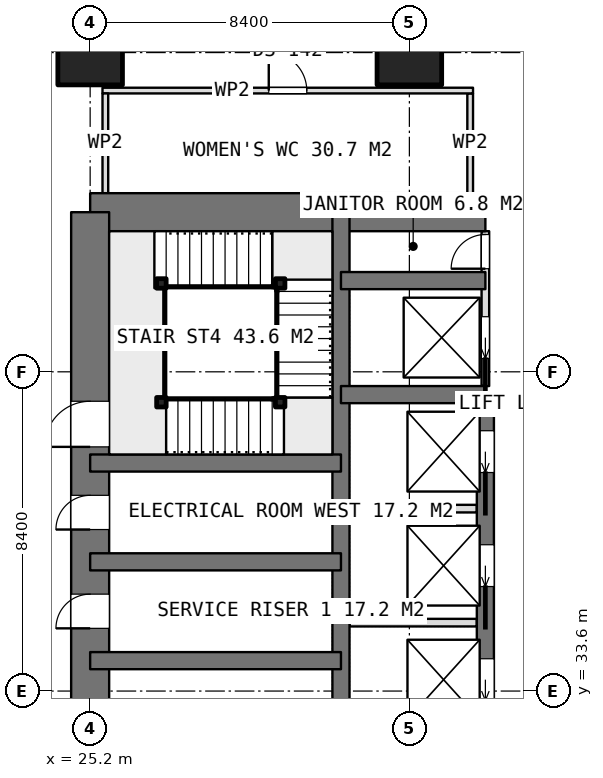
"""IFC4 building model, lengths in metres.
Left out: names, types, materials, properties, quantities, classifications, styles, units other than length and angle.
Written with IfcOpenShell. Run it as: python <this file> out.ifc"""

import sys

from ifc_helpers import new_model, si_unit, direction, frame, frame_2d, origin, origin_2d, place, context, subcontext, project, spatial, rectangle, extrude, element, fill, save


model = new_model("IFC4")
c1 = context("Model", 3, precision=1e-05, world=origin(), true_north=direction((0.0, 1.0)))
c2 = subcontext(c1, "Body", "Model", "MODEL_VIEW")
j1 = project(units=[si_unit("LENGTHUNIT", "METRE"), si_unit("PLANEANGLEUNIT", "RADIAN")], contexts=[c1])
p1 = place(None, origin())
s1 = spatial("IfcSite", under=j1, at=p1, CompositionType="ELEMENT")
p2 = place(p1, origin())
s2 = spatial("IfcBuilding", under=s1, at=p2, CompositionType="ELEMENT")
p3 = place(p2, frame((0.0, 0.0, 132.8)))
s3 = spatial("IfcBuildingStorey", under=s2, at=p3, CompositionType="ELEMENT", Elevation=132.8)
p4 = place(p3, frame((25.2, 46.2, 0.0), z_axis=(0.0, 0.0, 1.0), x_axis=(1.0, 0.0, 0.0)))
e1 = element("IfcWall", 1, at=p4, inside=s3, PredefinedType="SHEAR", context=c2, shape_type="SweptSolid", body=[
    extrude(rectangle(XDim=10.4, YDim=1.0, at=frame_2d((5.2, 0.0))), origin(), (0.0, 0.0, 1.0), 3.75),
])
p5 = place(p3, frame((25.2, 21.0, 0.0), z_axis=(0.0, 0.0, 1.0), x_axis=(0.0, 1.0, 0.0)))
e2 = element("IfcWall", 2, at=p5, inside=s3, PredefinedType="SHEAR", context=c2, shape_type="SweptSolid", body=[
    extrude(rectangle(XDim=25.2, YDim=1.0, at=frame_2d((12.6, 0.0))), origin(), (0.0, 0.0, 1.0), 3.75),
])
p6 = place(p5, frame((7.8, 0.0, 0.0)))
e3 = element("IfcOpeningElement", 3, at=p6, cuts=e2, PredefinedType="OPENING", context=c2, shape_type="SweptSolid", body=[
    extrude(rectangle(XDim=1.2, YDim=2.1, at=frame_2d((0.6, 1.05))), frame((0.0, 0.51, 0.0), z_axis=(0.0, -1.0, 0.0), x_axis=(1.0, 0.0, 0.0)), (0.0, 0.0, 1.0), 1.02),
])
p7 = place(p5, frame((14.25, 0.0, 0.0)))
e4 = element("IfcOpeningElement", 4, at=p7, cuts=e2, PredefinedType="OPENING", context=c2, shape_type="SweptSolid", body=[
    extrude(rectangle(XDim=0.9, YDim=2.1, at=frame_2d((0.45, 1.05))), frame((0.0, 0.51, 0.0), z_axis=(0.0, -1.0, 0.0), x_axis=(1.0, 0.0, 0.0)), (0.0, 0.0, 1.0), 1.02),
])
p8 = place(p5, frame((16.85, 0.0, 0.0)))
e5 = element("IfcOpeningElement", 5, at=p8, cuts=e2, PredefinedType="OPENING", context=c2, shape_type="SweptSolid", body=[
    extrude(rectangle(XDim=0.9, YDim=2.1, at=frame_2d((0.45, 1.05))), frame((0.0, 0.51, 0.0), z_axis=(0.0, -1.0, 0.0), x_axis=(1.0, 0.0, 0.0)), (0.0, 0.0, 1.0), 1.02),
])
p9 = place(p5, frame((19.025, 0.0, 0.0)))
e6 = element("IfcOpeningElement", 6, at=p9, cuts=e2, PredefinedType="OPENING", context=c2, shape_type="SweptSolid", body=[
    extrude(rectangle(XDim=1.2, YDim=2.1, at=frame_2d((0.6, 1.05))), frame((0.0, 0.51, 0.0), z_axis=(0.0, -1.0, 0.0), x_axis=(1.0, 0.0, 0.0)), (0.0, 0.0, 1.0), 1.02),
])
p10 = place(p3, frame((31.8, 21.0, 0.0), z_axis=(0.0, 0.0, 1.0), x_axis=(0.0, 1.0, 0.0)))
e7 = element("IfcWall", 7, at=p10, inside=s3, PredefinedType="SHEAR", context=c2, shape_type="SweptSolid", body=[
    extrude(rectangle(XDim=25.2, YDim=0.45, at=frame_2d((12.6, 0.0))), origin(), (0.0, 0.0, 1.0), 3.75),
])
p11 = place(p3, frame((35.6, 23.4, 0.0), z_axis=(0.0, 0.0, 1.0), x_axis=(0.0, 1.0, 0.0)))
e8 = element("IfcWall", 8, at=p11, inside=s3, PredefinedType="SHEAR", context=c2, shape_type="SweptSolid", body=[
    extrude(rectangle(XDim=18.0, YDim=0.45, at=frame_2d((9.0, 0.0))), origin(), (0.0, 0.0, 1.0), 3.75),
])
p12 = place(p11, frame((0.95, 0.0, 0.0)))
e9 = element("IfcOpeningElement", 9, at=p12, cuts=e8, PredefinedType="OPENING", context=c2, shape_type="SweptSolid", body=[
    extrude(rectangle(XDim=1.1, YDim=2.1, at=frame_2d((0.55, 1.05))), frame((0.0, 0.235, 0.0), z_axis=(0.0, -1.0, 0.0), x_axis=(1.0, 0.0, 0.0)), (0.0, 0.0, 1.0), 0.47),
])
p13 = place(p11, frame((3.95, 0.0, 0.0)))
e10 = element("IfcOpeningElement", 10, at=p13, cuts=e8, PredefinedType="OPENING", context=c2, shape_type="SweptSolid", body=[
    extrude(rectangle(XDim=1.1, YDim=2.1, at=frame_2d((0.55, 1.05))), frame((0.0, 0.235, 0.0), z_axis=(0.0, -1.0, 0.0), x_axis=(1.0, 0.0, 0.0)), (0.0, 0.0, 1.0), 0.47),
])
p14 = place(p11, frame((6.95, 0.0, 0.0)))
e11 = element("IfcOpeningElement", 11, at=p14, cuts=e8, PredefinedType="OPENING", context=c2, shape_type="SweptSolid", body=[
    extrude(rectangle(XDim=1.1, YDim=2.1, at=frame_2d((0.55, 1.05))), frame((0.0, 0.235, 0.0), z_axis=(0.0, -1.0, 0.0), x_axis=(1.0, 0.0, 0.0)), (0.0, 0.0, 1.0), 0.47),
])
p15 = place(p11, frame((9.95, 0.0, 0.0)))
e12 = element("IfcOpeningElement", 12, at=p15, cuts=e8, PredefinedType="OPENING", context=c2, shape_type="SweptSolid", body=[
    extrude(rectangle(XDim=1.1, YDim=2.1, at=frame_2d((0.55, 1.05))), frame((0.0, 0.235, 0.0), z_axis=(0.0, -1.0, 0.0), x_axis=(1.0, 0.0, 0.0)), (0.0, 0.0, 1.0), 0.47),
])
p16 = place(p11, frame((12.95, 0.0, 0.0)))
e13 = element("IfcOpeningElement", 13, at=p16, cuts=e8, PredefinedType="OPENING", context=c2, shape_type="SweptSolid", body=[
    extrude(rectangle(XDim=1.1, YDim=2.1, at=frame_2d((0.55, 1.05))), frame((0.0, 0.235, 0.0), z_axis=(0.0, -1.0, 0.0), x_axis=(1.0, 0.0, 0.0)), (0.0, 0.0, 1.0), 0.47),
])
p17 = place(p11, frame((15.95, 0.0, 0.0)))
e14 = element("IfcOpeningElement", 14, at=p17, cuts=e8, PredefinedType="OPENING", context=c2, shape_type="SweptSolid", body=[
    extrude(rectangle(XDim=1.1, YDim=2.1, at=frame_2d((0.55, 1.05))), frame((0.0, 0.235, 0.0), z_axis=(0.0, -1.0, 0.0), x_axis=(1.0, 0.0, 0.0)), (0.0, 0.0, 1.0), 0.47),
])
for number, where, z_axis, x_axis in (
    (15, (31.8, 41.4, 0.0), (0.0, 0.0, 1.0), (1.0, 0.0, 0.0)),
    (16, (31.8, 44.4, 0.0), (0.0, 0.0, 1.0), (1.0, 0.0, 0.0)),
):
    element("IfcWall", number, at=place(p3, frame(where, z_axis=z_axis, x_axis=x_axis)), inside=s3, PredefinedType="SHEAR", context=c2, shape_type="SweptSolid", body=[
        extrude(rectangle(XDim=3.8, YDim=0.45, at=frame_2d((1.9, 0.0))), origin(), (0.0, 0.0, 1.0), 3.75),
    ])
for number, where, z_axis, x_axis in (
    (17, (25.2, 34.4, 0.0), (0.0, 0.0, 1.0), (1.0, 0.0, 0.0)),
    (18, (25.2, 37.0, 0.0), (0.0, 0.0, 1.0), (1.0, 0.0, 0.0)),
    (19, (25.2, 39.6, 0.0), (0.0, 0.0, 1.0), (1.0, 0.0, 0.0)),
):
    element("IfcWall", number, at=place(p3, frame(where, z_axis=z_axis, x_axis=x_axis)), inside=s3, PredefinedType="SHEAR", context=c2, shape_type="SweptSolid", body=[
        extrude(rectangle(XDim=6.6, YDim=0.45, at=frame_2d((3.3, 0.0))), origin(), (0.0, 0.0, 1.0), 3.75),
    ])
for number, where, z_axis, x_axis in (
    (20, (25.2, 50.4, 0.0), (0.0, 0.0, 1.0), (1.0, 0.0, 0.0)),
    (21, (33.6, 50.4, 0.0), (0.0, 0.0, 1.0), (1.0, 0.0, 0.0)),
):
    element("IfcColumn", number, at=place(p3, frame(where, z_axis=z_axis, x_axis=x_axis)), inside=s3, PredefinedType="COLUMN", context=c2, shape_type="SweptSolid", body=[
        extrude(rectangle(XDim=1.7, YDim=1.7, at=origin_2d()), origin(), (0.0, 0.0, 1.0), 3.75),
    ])
for number, where, z_axis, x_axis in (
    (22, (32.025, 35.4, 0.0), (0.0, 0.0, 1.0), (1.0, 0.0, 0.0)),
    (23, (32.025, 38.4, 0.0), (0.0, 0.0, 1.0), (1.0, 0.0, 0.0)),
):
    element("IfcWall", number, at=place(p3, frame(where, z_axis=z_axis, x_axis=x_axis)), inside=s3, PredefinedType="PARTITIONING", context=c2, shape_type="SweptSolid", body=[
        extrude(rectangle(XDim=3.35, YDim=0.2, at=frame_2d((1.675, 0.0))), origin(), (0.0, 0.0, 1.0), 3.5),
    ])
p18 = place(p3, frame((35.6, 41.625, 0.0), z_axis=(0.0, 0.0, 1.0), x_axis=(0.0, 1.0, 0.0)))
e24 = element("IfcWall", 24, at=p18, inside=s3, PredefinedType="PARTITIONING", context=c2, shape_type="SweptSolid", body=[
    extrude(rectangle(XDim=4.075, YDim=0.2, at=frame_2d((2.038, 0.0))), origin(), (0.0, 0.0, 1.0), 3.5),
])
p19 = place(p18, frame((3.088, 0.0, 0.0)))
e25 = element("IfcOpeningElement", 25, at=p19, cuts=e24, PredefinedType="OPENING", context=c2, shape_type="SweptSolid", body=[
    extrude(rectangle(XDim=0.9, YDim=2.1, at=frame_2d((0.45, 1.05))), frame((0.0, 0.11, 0.0), z_axis=(0.0, -1.0, 0.0), x_axis=(1.0, 0.0, 0.0)), (0.0, 0.0, 1.0), 0.22),
])
p20 = place(p18, frame((0.725, 0.0, 0.0)))
e26 = element("IfcOpeningElement", 26, at=p20, cuts=e24, PredefinedType="OPENING", context=c2, shape_type="SweptSolid", body=[
    extrude(rectangle(XDim=1.1, YDim=2.1, at=frame_2d((0.55, 1.05))), frame((0.0, 0.11, 0.0), z_axis=(0.0, -1.0, 0.0), x_axis=(1.0, 0.0, 0.0)), (0.0, 0.0, 1.0), 0.22),
])
p21 = place(p3, frame((25.525, 49.4, 0.0), z_axis=(0.0, 0.0, 1.0), x_axis=(1.0, 0.0, 0.0)))
e27 = element("IfcWall", 27, at=p21, inside=s3, PredefinedType="PARTITIONING", context=c2, shape_type="SweptSolid", body=[
    extrude(rectangle(XDim=9.75, YDim=0.15, at=frame_2d((4.875, 0.0))), origin(), (0.0, 0.0, 1.0), 3.5),
])
p22 = place(p21, frame((4.375, 0.0, 0.0)))
e28 = element("IfcOpeningElement", 28, at=p22, cuts=e27, PredefinedType="OPENING", context=c2, shape_type="SweptSolid", body=[
    extrude(rectangle(XDim=1.0, YDim=2.1, at=frame_2d((0.5, 1.05))), frame((0.0, 0.085, 0.0), z_axis=(0.0, -1.0, 0.0), x_axis=(1.0, 0.0, 0.0)), (0.0, 0.0, 1.0), 0.17),
])
for number, where, z_axis, x_axis in (
    (29, (25.6, 46.7, 0.0), (0.0, 0.0, 1.0), (0.0, 1.0, 0.0)),
    (30, (35.2, 46.7, 0.0), (0.0, 0.0, 1.0), (0.0, 1.0, 0.0)),
):
    element("IfcWall", number, at=place(p3, frame(where, z_axis=z_axis, x_axis=x_axis)), inside=s3, PredefinedType="PARTITIONING", context=c2, shape_type="SweptSolid", body=[
        extrude(rectangle(XDim=2.625, YDim=0.15, at=frame_2d((1.312, 0.0))), origin(), (0.0, 0.0, 1.0), 3.5),
    ])
for number, where, z_axis, x_axis in (
    (31, (27.075, 41.2, 0.0), (0.0, 0.0, 1.0), (1.0, 0.0, 0.0)),
    (32, (30.2, 41.2, 0.0), (0.0, 0.0, 1.0), (1.0, 0.0, 0.0)),
    (33, (30.2, 44.325, 0.0), (0.0, 0.0, 1.0), (1.0, 0.0, 0.0)),
    (34, (27.075, 44.325, 0.0), (0.0, 0.0, 1.0), (1.0, 0.0, 0.0)),
):
    element("IfcColumn", number, at=place(p3, frame(where, z_axis=z_axis, x_axis=x_axis)), inside=s3, PredefinedType="COLUMN", context=c2, shape_type="SweptSolid", body=[
        extrude(rectangle(XDim=0.25, YDim=0.25, at=origin_2d()), origin(), (0.0, 0.0, 1.0), 3.75),
    ])
p23 = place(p7, origin())
e35 = element("IfcDoor", 35, at=p23, inside=s3, OperationType="SINGLE_SWING_LEFT", PredefinedType="DOOR", context=c2, shape_type="SweptSolid", body=[
    extrude(rectangle(XDim=0.9, YDim=2.1, at=frame_2d((0.45, 1.05))), frame((0.0, 0.025, 0.0), z_axis=(0.0, -1.0, 0.0), x_axis=(1.0, 0.0, 0.0)), (0.0, 0.0, 1.0), 0.05),
])
fill(e4, e35)
p24 = place(p8, origin())
e36 = element("IfcDoor", 36, at=p24, inside=s3, OperationType="SINGLE_SWING_LEFT", PredefinedType="DOOR", context=c2, shape_type="SweptSolid", body=[
    extrude(rectangle(XDim=0.9, YDim=2.1, at=frame_2d((0.45, 1.05))), frame((0.0, 0.025, 0.0), z_axis=(0.0, -1.0, 0.0), x_axis=(1.0, 0.0, 0.0)), (0.0, 0.0, 1.0), 0.05),
])
fill(e5, e36)
p25 = place(p19, origin())
e37 = element("IfcDoor", 37, at=p25, inside=s3, OperationType="SINGLE_SWING_LEFT", PredefinedType="DOOR", context=c2, shape_type="SweptSolid", body=[
    extrude(rectangle(XDim=0.9, YDim=2.1, at=frame_2d((0.45, 1.05))), frame((0.0, 0.025, 0.0), z_axis=(0.0, -1.0, 0.0), x_axis=(1.0, 0.0, 0.0)), (0.0, 0.0, 1.0), 0.05),
])
fill(e25, e37)
p26 = place(p15, origin())
e38 = element("IfcDoor", 38, at=p26, inside=s3, OperationType="SLIDING_TO_LEFT", PredefinedType="USERDEFINED", context=c2, shape_type="SweptSolid", body=[
    extrude(rectangle(XDim=1.1, YDim=2.1, at=frame_2d((0.55, 1.05))), frame((0.0, 0.025, 0.0), z_axis=(0.0, -1.0, 0.0), x_axis=(1.0, 0.0, 0.0)), (0.0, 0.0, 1.0), 0.05),
])
fill(e12, e38)
p27 = place(p16, origin())
e39 = element("IfcDoor", 39, at=p27, inside=s3, OperationType="SLIDING_TO_LEFT", PredefinedType="USERDEFINED", context=c2, shape_type="SweptSolid", body=[
    extrude(rectangle(XDim=1.1, YDim=2.1, at=frame_2d((0.55, 1.05))), frame((0.0, 0.025, 0.0), z_axis=(0.0, -1.0, 0.0), x_axis=(1.0, 0.0, 0.0)), (0.0, 0.0, 1.0), 0.05),
])
fill(e13, e39)
p28 = place(p17, origin())
e40 = element("IfcDoor", 40, at=p28, inside=s3, OperationType="SLIDING_TO_LEFT", PredefinedType="USERDEFINED", context=c2, shape_type="SweptSolid", body=[
    extrude(rectangle(XDim=1.1, YDim=2.1, at=frame_2d((0.55, 1.05))), frame((0.0, 0.025, 0.0), z_axis=(0.0, -1.0, 0.0), x_axis=(1.0, 0.0, 0.0)), (0.0, 0.0, 1.0), 0.05),
])
fill(e14, e40)
p29 = place(p20, origin())
e41 = element("IfcDoor", 41, at=p29, inside=s3, OperationType="SLIDING_TO_LEFT", PredefinedType="USERDEFINED", context=c2, shape_type="SweptSolid", body=[
    extrude(rectangle(XDim=1.1, YDim=2.1, at=frame_2d((0.55, 1.05))), frame((0.0, 0.025, 0.0), z_axis=(0.0, -1.0, 0.0), x_axis=(1.0, 0.0, 0.0)), (0.0, 0.0, 1.0), 0.05),
])
fill(e26, e41)
p30 = place(p22, origin())
e42 = element("IfcDoor", 42, at=p30, inside=s3, OperationType="SINGLE_SWING_LEFT", PredefinedType="DOOR", context=c2, shape_type="SweptSolid", body=[
    extrude(rectangle(XDim=1.0, YDim=2.1, at=frame_2d((0.5, 1.05))), frame((0.0, 0.025, 0.0), z_axis=(0.0, -1.0, 0.0), x_axis=(1.0, 0.0, 0.0)), (0.0, 0.0, 1.0), 0.05),
])
fill(e28, e42)
p31 = place(p9, origin())
e43 = element("IfcDoor", 43, at=p31, inside=s3, OperationType="SINGLE_SWING_RIGHT", PredefinedType="DOOR", context=c2, shape_type="SweptSolid", body=[
    extrude(rectangle(XDim=1.2, YDim=2.1, at=frame_2d((0.6, 1.05))), frame((0.0, 0.025, 0.0), z_axis=(0.0, -1.0, 0.0), x_axis=(1.0, 0.0, 0.0)), (0.0, 0.0, 1.0), 0.05),
])
fill(e6, e43)
save(model, sys.argv[1])
